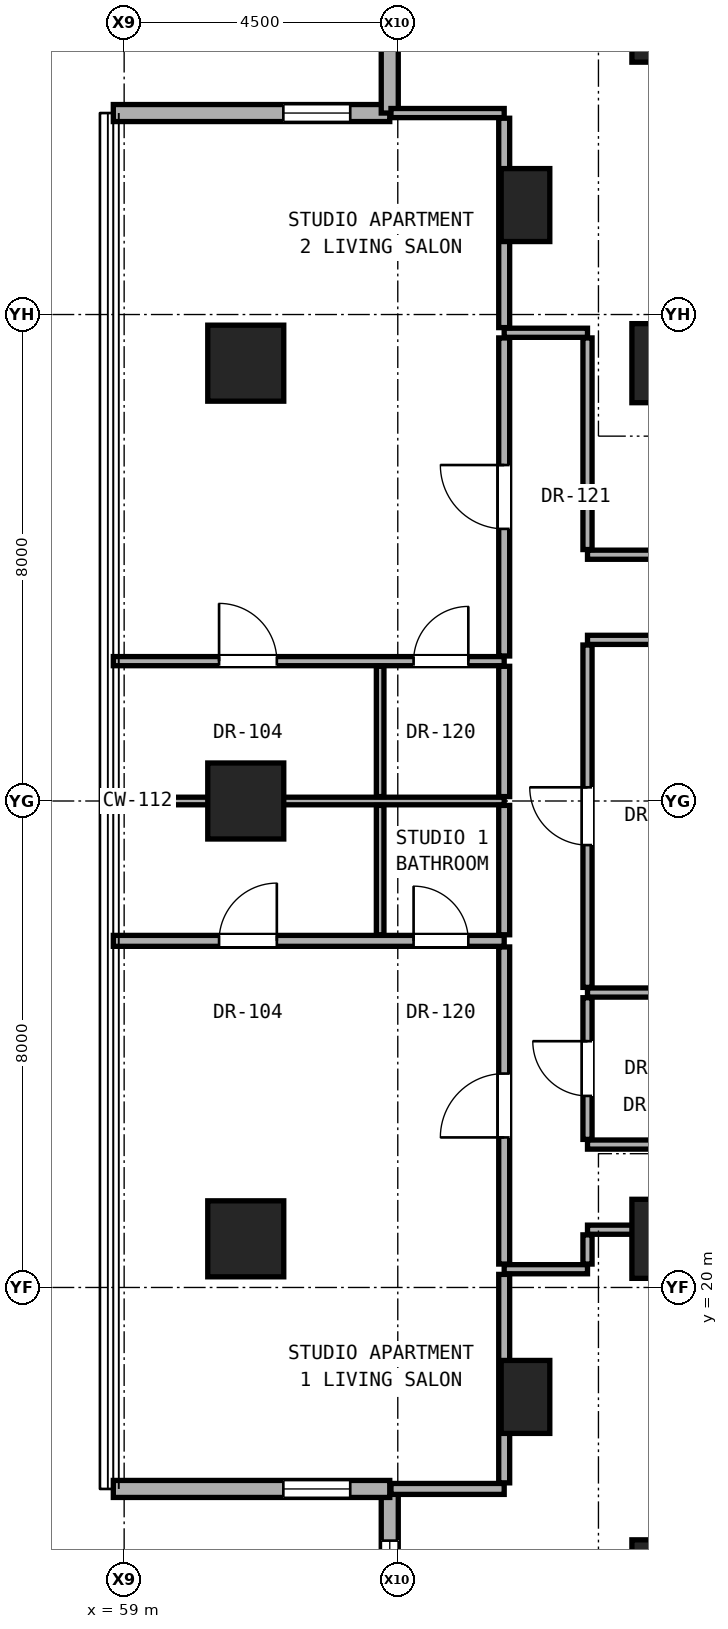
"""IFC4 building model, lengths in metres.
Left out: names, types, materials, properties, quantities, classifications, styles, units other than length and angle.
Written with IfcOpenShell. Run it as: python <this file> out.ifc"""

import sys

from ifc_helpers import new_model, si_unit, direction, frame, frame_2d, origin, origin_2d, place, context, subcontext, project, spatial, rectangle, hollow_rectangle, extrude, element, fill, save


model = new_model("IFC4")
c1 = context("Model", 3, precision=1e-05, world=origin(), true_north=direction((0.0, 1.0)))
c2 = subcontext(c1, "Body", "Model", "MODEL_VIEW")
j1 = project(units=[si_unit("LENGTHUNIT", "METRE"), si_unit("PLANEANGLEUNIT", "RADIAN")], contexts=[c1])
p1 = place(None, origin())
s1 = spatial("IfcSite", under=j1, at=p1, CompositionType="ELEMENT")
p2 = place(p1, origin())
s2 = spatial("IfcBuilding", under=s1, at=p2, CompositionType="ELEMENT")
p3 = place(p2, frame((0.0, 0.0, 55.4)))
s3 = spatial("IfcBuildingStorey", under=s2, at=p3, CompositionType="ELEMENT", Elevation=55.4)
for number, where, z_axis, x_axis in (
    (1, (68.0, 15.2, 0.0), (0.0, 0.0, 1.0), (1.0, 0.0, 0.0)),
    (2, (68.0, 20.8, 0.0), (0.0, 0.0, 1.0), (1.0, 0.0, 0.0)),
    (3, (68.0, 35.2, 0.0), (0.0, 0.0, 1.0), (1.0, 0.0, 0.0)),
    (4, (68.0, 40.8, 0.0), (0.0, 0.0, 1.0), (1.0, 0.0, 0.0)),
):
    element("IfcColumn", number, at=place(p3, frame(where, z_axis=z_axis, x_axis=x_axis)), inside=s3, PredefinedType="COLUMN", context=c2, shape_type="SweptSolid", body=[
        extrude(rectangle(XDim=1.3, YDim=1.3, at=origin_2d()), origin(), (0.0, 0.0, 1.0), 3.3),
    ])
for number, where, z_axis, x_axis in (
    (5, (61.0, 20.8, 0.0), (0.0, 0.0, 1.0), (1.0, 0.0, 0.0)),
    (6, (61.0, 28.0, 0.0), (0.0, 0.0, 1.0), (1.0, 0.0, 0.0)),
    (7, (61.0, 35.2, 0.0), (0.0, 0.0, 1.0), (1.0, 0.0, 0.0)),
):
    element("IfcColumn", number, at=place(p3, frame(where, z_axis=z_axis, x_axis=x_axis)), inside=s3, PredefinedType="COLUMN", context=c2, shape_type="SweptSolid", body=[
        extrude(hollow_rectangle(XDim=1.25, YDim=1.25, WallThickness=0.07, at=origin_2d()), origin(), (0.0, 0.0, 1.0), 3.3),
    ])
for number, where, z_axis, x_axis in (
    (8, (65.6, 18.2, 0.0), (0.0, 0.0, 1.0), (1.0, 0.0, 0.0)),
    (9, (65.6, 37.8, 0.0), (0.0, 0.0, 1.0), (1.0, 0.0, 0.0)),
):
    element("IfcColumn", number, at=place(p3, frame(where, z_axis=z_axis, x_axis=x_axis)), inside=s3, PredefinedType="PILASTER", context=c2, shape_type="SweptSolid", body=[
        extrude(rectangle(XDim=0.8, YDim=1.2, at=origin_2d()), origin(), (0.0, 0.0, 1.0), 3.3),
    ])
p4 = place(p3, frame((63.368, 16.687, 0.0), z_axis=(0.0, 0.0, 1.0), x_axis=(0.0, -1.0, 0.0)))
e10 = element("IfcWall", 10, at=p4, inside=s3, PredefinedType="SOLIDWALL", context=c2, shape_type="SweptSolid", body=[
    extrude(rectangle(XDim=4.546, YDim=0.28, at=frame_2d((2.273, 0.0))), origin(), (0.0, 0.0, 1.0), 3.04),
])
p5 = place(p4, frame((0.85, 0.0, 0.79)))
e11 = element("IfcOpeningElement", 11, at=p5, cuts=e10, PredefinedType="OPENING", context=c2, shape_type="SweptSolid", body=[
    extrude(rectangle(XDim=1.8, YDim=2.1, at=frame_2d((0.9, 1.05))), frame((0.0, 0.15, 0.0), z_axis=(0.0, -1.0, 0.0), x_axis=(1.0, 0.0, 0.0)), (0.0, 0.0, 1.0), 0.3),
])
p6 = place(p3, frame((58.822, 16.687, 0.0), z_axis=(0.0, 0.0, 1.0), x_axis=(1.0, 0.0, 0.0)))
e12 = element("IfcWall", 12, at=p6, inside=s3, PredefinedType="SOLIDWALL", context=c2, shape_type="SweptSolid", body=[
    extrude(rectangle(XDim=4.546, YDim=0.28, at=frame_2d((2.273, 0.0))), origin(), (0.0, 0.0, 1.0), 3.04),
])
p7 = place(p6, frame((2.796, 0.0, 0.85)))
e13 = element("IfcOpeningElement", 13, at=p7, cuts=e12, PredefinedType="OPENING", context=c2, shape_type="SweptSolid", body=[
    extrude(rectangle(XDim=1.1, YDim=2.0, at=frame_2d((0.55, 1.0))), frame((0.0, 0.15, 0.0), z_axis=(0.0, -1.0, 0.0), x_axis=(1.0, 0.0, 0.0)), (0.0, 0.0, 1.0), 0.3),
])
p8 = place(p3, frame((63.368, 39.313, 0.0), z_axis=(0.0, 0.0, 1.0), x_axis=(-1.0, 0.0, 0.0)))
e14 = element("IfcWall", 14, at=p8, inside=s3, PredefinedType="SOLIDWALL", context=c2, shape_type="SweptSolid", body=[
    extrude(rectangle(XDim=4.546, YDim=0.28, at=frame_2d((2.273, 0.0))), origin(), (0.0, 0.0, 1.0), 3.04),
])
p9 = place(p8, frame((0.65, 0.0, 0.85)))
e15 = element("IfcOpeningElement", 15, at=p9, cuts=e14, PredefinedType="OPENING", context=c2, shape_type="SweptSolid", body=[
    extrude(rectangle(XDim=1.1, YDim=2.0, at=frame_2d((0.55, 1.0))), frame((0.0, 0.15, 0.0), z_axis=(0.0, -1.0, 0.0), x_axis=(1.0, 0.0, 0.0)), (0.0, 0.0, 1.0), 0.3),
])
p10 = place(p3, frame((63.368, 43.859, 0.0), z_axis=(0.0, 0.0, 1.0), x_axis=(0.0, -1.0, 0.0)))
e16 = element("IfcWall", 16, at=p10, inside=s3, PredefinedType="SOLIDWALL", context=c2, shape_type="SweptSolid", body=[
    extrude(rectangle(XDim=4.546, YDim=0.28, at=frame_2d((2.273, 0.0))), origin(), (0.0, 0.0, 1.0), 3.04),
])
p11 = place(p3, frame((63.388, 16.687, 0.0), z_axis=(0.0, 0.0, 1.0), x_axis=(1.0, 0.0, 0.0)))
e17 = element("IfcWall", 17, at=p11, inside=s3, PredefinedType="PARTITIONING", context=c2, shape_type="SweptSolid", body=[
    extrude(rectangle(XDim=1.862, YDim=0.18, at=frame_2d((0.931, 0.0))), origin(), (0.0, 0.0, 1.0), 3.06),
])
p12 = place(p3, frame((65.25, 20.3, 0.0), z_axis=(0.0, 0.0, 1.0), x_axis=(1.0, 0.0, 0.0)))
e18 = element("IfcWall", 18, at=p12, inside=s3, PredefinedType="PARTITIONING", context=c2, shape_type="SweptSolid", body=[
    extrude(rectangle(XDim=1.37, YDim=0.15, at=frame_2d((0.685, 0.0))), origin(), (0.0, 0.0, 1.0), 3.06),
])
p13 = place(p3, frame((66.62, 20.95, 0.0), z_axis=(0.0, 0.0, 1.0), x_axis=(1.0, 0.0, 0.0)))
e19 = element("IfcWall", 19, at=p13, inside=s3, PredefinedType="PARTITIONING", context=c2, shape_type="SweptSolid", body=[
    extrude(rectangle(XDim=1.06, YDim=0.15, at=frame_2d((0.53, 0.0))), origin(), (0.0, 0.0, 1.0), 2.452),
])
p14 = place(p3, frame((66.62, 22.35, 0.0), z_axis=(0.0, 0.0, 1.0), x_axis=(1.0, 0.0, 0.0)))
e20 = element("IfcWall", 20, at=p14, inside=s3, PredefinedType="PARTITIONING", context=c2, shape_type="SweptSolid", body=[
    extrude(rectangle(XDim=19.63, YDim=0.15, at=frame_2d((9.815, 0.0))), origin(), (0.0, 0.0, 1.0), 2.125),
])
p15 = place(p14, frame((8.129, 0.0, 0.0)))
e21 = element("IfcOpeningElement", 21, at=p15, cuts=e20, PredefinedType="OPENING", context=c2, shape_type="SweptSolid", body=[
    extrude(rectangle(XDim=0.85, YDim=2.01, at=frame_2d((0.425, 1.005))), frame((0.0, 0.085, 0.0), z_axis=(0.0, -1.0, 0.0), x_axis=(1.0, 0.0, 0.0)), (0.0, 0.0, 1.0), 0.17),
])
p16 = place(p3, frame((66.62, 24.85, 0.0), z_axis=(0.0, 0.0, 1.0), x_axis=(1.0, 0.0, 0.0)))
e22 = element("IfcWall", 22, at=p16, inside=s3, PredefinedType="PARTITIONING", context=c2, shape_type="SweptSolid", body=[
    extrude(rectangle(XDim=3.13, YDim=0.15, at=frame_2d((1.565, 0.0))), origin(), (0.0, 0.0, 1.0), 2.125),
])
p17 = place(p3, frame((58.822, 25.7, 0.0), z_axis=(0.0, 0.0, 1.0), x_axis=(1.0, 0.0, 0.0)))
e23 = element("IfcWall", 23, at=p17, inside=s3, PredefinedType="PARTITIONING", context=c2, shape_type="SweptSolid", body=[
    extrude(rectangle(XDim=6.428, YDim=0.18, at=frame_2d((3.214, 0.0))), origin(), (0.0, 0.0, 1.0), 2.196),
])
p18 = place(p17, frame((1.739, 0.0, 0.0)))
e24 = element("IfcOpeningElement", 24, at=p18, cuts=e23, PredefinedType="OPENING", context=c2, shape_type="SweptSolid", body=[
    extrude(rectangle(XDim=0.95, YDim=2.15, at=frame_2d((0.475, 1.075))), frame((0.0, 0.1, 0.0), z_axis=(0.0, -1.0, 0.0), x_axis=(1.0, 0.0, 0.0)), (0.0, 0.0, 1.0), 0.2),
])
p19 = place(p17, frame((4.938, 0.0, 0.0)))
e25 = element("IfcOpeningElement", 25, at=p19, cuts=e23, PredefinedType="OPENING", context=c2, shape_type="SweptSolid", body=[
    extrude(rectangle(XDim=0.9, YDim=2.1, at=frame_2d((0.45, 1.05))), frame((0.0, 0.1, 0.0), z_axis=(0.0, -1.0, 0.0), x_axis=(1.0, 0.0, 0.0)), (0.0, 0.0, 1.0), 0.2),
])
p20 = place(p3, frame((58.822, 28.0, 0.0), z_axis=(0.0, 0.0, 1.0), x_axis=(1.0, 0.0, 0.0)))
e26 = element("IfcWall", 26, at=p20, inside=s3, PredefinedType="PARTITIONING", context=c2, shape_type="SweptSolid", body=[
    extrude(rectangle(XDim=6.428, YDim=0.125, at=frame_2d((3.214, 0.0))), origin(), (0.0, 0.0, 1.0), 2.196),
])
p21 = place(p3, frame((58.822, 30.3, 0.0), z_axis=(0.0, 0.0, 1.0), x_axis=(1.0, 0.0, 0.0)))
e27 = element("IfcWall", 27, at=p21, inside=s3, PredefinedType="PARTITIONING", context=c2, shape_type="SweptSolid", body=[
    extrude(rectangle(XDim=6.428, YDim=0.15, at=frame_2d((3.214, 0.0))), origin(), (0.0, 0.0, 1.0), 2.196),
])
p22 = place(p21, frame((1.739, 0.0, 0.0)))
e28 = element("IfcOpeningElement", 28, at=p22, cuts=e27, PredefinedType="OPENING", context=c2, shape_type="SweptSolid", body=[
    extrude(rectangle(XDim=0.95, YDim=2.15, at=frame_2d((0.475, 1.075))), frame((0.0, 0.085, 0.0), z_axis=(0.0, -1.0, 0.0), x_axis=(1.0, 0.0, 0.0)), (0.0, 0.0, 1.0), 0.17),
])
p23 = place(p21, frame((4.938, 0.0, 0.0)))
e29 = element("IfcOpeningElement", 29, at=p23, cuts=e27, PredefinedType="OPENING", context=c2, shape_type="SweptSolid", body=[
    extrude(rectangle(XDim=0.9, YDim=2.1, at=frame_2d((0.45, 1.05))), frame((0.0, 0.085, 0.0), z_axis=(0.0, -1.0, 0.0), x_axis=(1.0, 0.0, 0.0)), (0.0, 0.0, 1.0), 0.17),
])
p24 = place(p3, frame((66.62, 30.65, 0.0), z_axis=(0.0, 0.0, 1.0), x_axis=(1.0, 0.0, 0.0)))
e30 = element("IfcWall", 30, at=p24, inside=s3, PredefinedType="PARTITIONING", context=c2, shape_type="SweptSolid", body=[
    extrude(rectangle(XDim=19.63, YDim=0.15, at=frame_2d((9.815, 0.0))), origin(), (0.0, 0.0, 1.0), 2.125),
])
p25 = place(p24, frame((3.855, 0.0, 0.0)))
e31 = element("IfcOpeningElement", 31, at=p25, cuts=e30, PredefinedType="OPENING", context=c2, shape_type="SweptSolid", body=[
    extrude(rectangle(XDim=0.85, YDim=2.01, at=frame_2d((0.425, 1.005))), frame((0.0, 0.085, 0.0), z_axis=(0.0, -1.0, 0.0), x_axis=(1.0, 0.0, 0.0)), (0.0, 0.0, 1.0), 0.17),
])
p26 = place(p24, frame((15.209, 0.0, 0.0)))
e32 = element("IfcOpeningElement", 32, at=p26, cuts=e30, PredefinedType="OPENING", context=c2, shape_type="SweptSolid", body=[
    extrude(rectangle(XDim=0.85, YDim=2.01, at=frame_2d((0.425, 1.005))), frame((0.0, 0.085, 0.0), z_axis=(0.0, -1.0, 0.0), x_axis=(1.0, 0.0, 0.0)), (0.0, 0.0, 1.0), 0.17),
])
p27 = place(p3, frame((66.62, 32.05, 0.0), z_axis=(0.0, 0.0, 1.0), x_axis=(1.0, 0.0, 0.0)))
e33 = element("IfcWall", 33, at=p27, inside=s3, PredefinedType="PARTITIONING", context=c2, shape_type="SweptSolid", body=[
    extrude(rectangle(XDim=2.18, YDim=0.15, at=frame_2d((1.09, 0.0))), origin(), (0.0, 0.0, 1.0), 2.125),
])
p28 = place(p3, frame((65.25, 35.7, 0.0), z_axis=(0.0, 0.0, 1.0), x_axis=(1.0, 0.0, 0.0)))
e34 = element("IfcWall", 34, at=p28, inside=s3, PredefinedType="PARTITIONING", context=c2, shape_type="SweptSolid", body=[
    extrude(rectangle(XDim=1.37, YDim=0.15, at=frame_2d((0.685, 0.0))), origin(), (0.0, 0.0, 1.0), 3.06),
])
p29 = place(p3, frame((63.388, 39.313, 0.0), z_axis=(0.0, 0.0, 1.0), x_axis=(1.0, 0.0, 0.0)))
e35 = element("IfcWall", 35, at=p29, inside=s3, PredefinedType="PARTITIONING", context=c2, shape_type="SweptSolid", body=[
    extrude(rectangle(XDim=1.862, YDim=0.15, at=frame_2d((0.931, 0.0))), origin(), (0.0, 0.0, 1.0), 3.06),
])
p30 = place(p3, frame((63.21, 25.8, 0.0), z_axis=(0.0, 0.0, 1.0), x_axis=(0.0, 1.0, 0.0)))
e36 = element("IfcWall", 36, at=p30, inside=s3, PredefinedType="PARTITIONING", context=c2, shape_type="SweptSolid", body=[
    extrude(rectangle(XDim=2.127, YDim=0.125, at=frame_2d((1.064, 0.0))), origin(), (0.0, 0.0, 1.0), 2.279),
])
p31 = place(p3, frame((63.21, 28.073, 0.0), z_axis=(0.0, 0.0, 1.0), x_axis=(0.0, 1.0, 0.0)))
e37 = element("IfcWall", 37, at=p31, inside=s3, PredefinedType="PARTITIONING", context=c2, shape_type="SweptSolid", body=[
    extrude(rectangle(XDim=2.143, YDim=0.125, at=frame_2d((1.071, 0.0))), origin(), (0.0, 0.0, 1.0), 2.279),
])
p32 = place(p3, frame((65.25, 16.787, 0.0), z_axis=(0.0, 0.0, 1.0), x_axis=(0.0, 1.0, 0.0)))
e38 = element("IfcWall", 38, at=p32, inside=s3, PredefinedType="PARTITIONING", context=c2, shape_type="SweptSolid", body=[
    extrude(rectangle(XDim=3.428, YDim=0.18, at=frame_2d((1.714, 0.0))), origin(), (0.0, 0.0, 1.0), 2.436),
])
p33 = place(p3, frame((65.25, 20.385, 0.0), z_axis=(0.0, 0.0, 1.0), x_axis=(0.0, 1.0, 0.0)))
e39 = element("IfcWall", 39, at=p33, inside=s3, PredefinedType="PARTITIONING", context=c2, shape_type="SweptSolid", body=[
    extrude(rectangle(XDim=5.215, YDim=0.18, at=frame_2d((2.607, 0.0))), origin(), (0.0, 0.0, 1.0), 2.452),
])
p34 = place(p33, frame((2.083, 0.0, 0.0)))
e40 = element("IfcOpeningElement", 40, at=p34, cuts=e39, PredefinedType="OPENING", context=c2, shape_type="SweptSolid", body=[
    extrude(rectangle(XDim=1.05, YDim=2.2, at=frame_2d((0.525, 1.1))), frame((0.0, 0.1, 0.0), z_axis=(0.0, -1.0, 0.0), x_axis=(1.0, 0.0, 0.0)), (0.0, 0.0, 1.0), 0.2),
])
p35 = place(p3, frame((65.25, 25.8, 0.0), z_axis=(0.0, 0.0, 1.0), x_axis=(0.0, 1.0, 0.0)))
e41 = element("IfcWall", 41, at=p35, inside=s3, PredefinedType="PARTITIONING", context=c2, shape_type="SweptSolid", body=[
    extrude(rectangle(XDim=2.127, YDim=0.18, at=frame_2d((1.064, 0.0))), origin(), (0.0, 0.0, 1.0), 2.279),
])
p36 = place(p3, frame((65.25, 28.073, 0.0), z_axis=(0.0, 0.0, 1.0), x_axis=(0.0, 1.0, 0.0)))
e42 = element("IfcWall", 42, at=p36, inside=s3, PredefinedType="PARTITIONING", context=c2, shape_type="SweptSolid", body=[
    extrude(rectangle(XDim=2.143, YDim=0.18, at=frame_2d((1.071, 0.0))), origin(), (0.0, 0.0, 1.0), 2.279),
])
p37 = place(p3, frame((65.25, 30.385, 0.0), z_axis=(0.0, 0.0, 1.0), x_axis=(0.0, 1.0, 0.0)))
e43 = element("IfcWall", 43, at=p37, inside=s3, PredefinedType="PARTITIONING", context=c2, shape_type="SweptSolid", body=[
    extrude(rectangle(XDim=5.23, YDim=0.18, at=frame_2d((2.615, 0.0))), origin(), (0.0, 0.0, 1.0), 2.452),
])
p38 = place(p37, frame((2.09, 0.0, 0.0)))
e44 = element("IfcOpeningElement", 44, at=p38, cuts=e43, PredefinedType="OPENING", context=c2, shape_type="SweptSolid", body=[
    extrude(rectangle(XDim=1.05, YDim=2.2, at=frame_2d((0.525, 1.1))), frame((0.0, 0.1, 0.0), z_axis=(0.0, -1.0, 0.0), x_axis=(1.0, 0.0, 0.0)), (0.0, 0.0, 1.0), 0.2),
])
p39 = place(p3, frame((65.25, 35.785, 0.0), z_axis=(0.0, 0.0, 1.0), x_axis=(0.0, 1.0, 0.0)))
e45 = element("IfcWall", 45, at=p39, inside=s3, PredefinedType="PARTITIONING", context=c2, shape_type="SweptSolid", body=[
    extrude(rectangle(XDim=3.443, YDim=0.18, at=frame_2d((1.722, 0.0))), origin(), (0.0, 0.0, 1.0), 2.436),
])
p40 = place(p3, frame((66.62, 20.385, 0.0), z_axis=(0.0, 0.0, 1.0), x_axis=(0.0, 1.0, 0.0)))
e46 = element("IfcWall", 46, at=p40, inside=s3, PredefinedType="PARTITIONING", context=c2, shape_type="SweptSolid", body=[
    extrude(rectangle(XDim=0.48, YDim=0.15, at=frame_2d((0.24, 0.0))), origin(), (0.0, 0.0, 1.0), 2.452),
])
p41 = place(p3, frame((66.62, 22.435, 0.0), z_axis=(0.0, 0.0, 1.0), x_axis=(0.0, 1.0, 0.0)))
e47 = element("IfcWall", 47, at=p41, inside=s3, PredefinedType="PARTITIONING", context=c2, shape_type="SweptSolid", body=[
    extrude(rectangle(XDim=2.33, YDim=0.15, at=frame_2d((1.165, 0.0))), origin(), (0.0, 0.0, 1.0), 3.06),
])
p42 = place(p41, frame((0.715, 0.0, 0.0)))
e48 = element("IfcOpeningElement", 48, at=p42, cuts=e47, PredefinedType="OPENING", context=c2, shape_type="SweptSolid", body=[
    extrude(rectangle(XDim=0.9, YDim=2.1, at=frame_2d((0.45, 1.05))), frame((0.0, 0.085, 0.0), z_axis=(0.0, -1.0, 0.0), x_axis=(1.0, 0.0, 0.0)), (0.0, 0.0, 1.0), 0.17),
])
p43 = place(p3, frame((66.62, 24.935, 0.0), z_axis=(0.0, 0.0, 1.0), x_axis=(0.0, 1.0, 0.0)))
e49 = element("IfcWall", 49, at=p43, inside=s3, PredefinedType="PARTITIONING", context=c2, shape_type="SweptSolid", body=[
    extrude(rectangle(XDim=5.63, YDim=0.15, at=frame_2d((2.815, 0.0))), origin(), (0.0, 0.0, 1.0), 2.279),
])
p44 = place(p43, frame((2.34, 0.0, 0.0)))
e50 = element("IfcOpeningElement", 50, at=p44, cuts=e49, PredefinedType="OPENING", context=c2, shape_type="SweptSolid", body=[
    extrude(rectangle(XDim=0.95, YDim=2.15, at=frame_2d((0.475, 1.075))), frame((0.0, 0.085, 0.0), z_axis=(0.0, -1.0, 0.0), x_axis=(1.0, 0.0, 0.0)), (0.0, 0.0, 1.0), 0.17),
])
p45 = place(p3, frame((66.62, 32.135, 0.0), z_axis=(0.0, 0.0, 1.0), x_axis=(0.0, 1.0, 0.0)))
e51 = element("IfcWall", 51, at=p45, inside=s3, PredefinedType="PARTITIONING", context=c2, shape_type="SweptSolid", body=[
    extrude(rectangle(XDim=3.48, YDim=0.15, at=frame_2d((1.74, 0.0))), origin(), (0.0, 0.0, 1.0), 2.452),
])
p46 = place(p5, origin())
e52 = element("IfcWindow", 52, at=p46, inside=s3, PartitioningType="SINGLE_PANEL", PredefinedType="WINDOW", context=c2, shape_type="SweptSolid", body=[
    extrude(rectangle(XDim=1.8, YDim=2.1, at=frame_2d((0.9, 1.05))), frame((0.0, 0.03, 0.0), z_axis=(0.0, -1.0, 0.0), x_axis=(1.0, 0.0, 0.0)), (0.0, 0.0, 1.0), 0.06),
])
fill(e11, e52)
p47 = place(p7, origin())
e53 = element("IfcWindow", 53, at=p47, inside=s3, PartitioningType="SINGLE_PANEL", PredefinedType="WINDOW", context=c2, shape_type="SweptSolid", body=[
    extrude(rectangle(XDim=1.1, YDim=2.0, at=frame_2d((0.55, 1.0))), frame((0.0, 0.03, 0.0), z_axis=(0.0, -1.0, 0.0), x_axis=(1.0, 0.0, 0.0)), (0.0, 0.0, 1.0), 0.06),
])
fill(e13, e53)
p48 = place(p9, origin())
e54 = element("IfcWindow", 54, at=p48, inside=s3, PartitioningType="SINGLE_PANEL", PredefinedType="WINDOW", context=c2, shape_type="SweptSolid", body=[
    extrude(rectangle(XDim=1.1, YDim=2.0, at=frame_2d((0.55, 1.0))), frame((0.0, 0.03, 0.0), z_axis=(0.0, -1.0, 0.0), x_axis=(1.0, 0.0, 0.0)), (0.0, 0.0, 1.0), 0.06),
])
fill(e15, e54)
p49 = place(p42, origin())
e55 = element("IfcDoor", 55, at=p49, inside=s3, OperationType="SINGLE_SWING_RIGHT", PredefinedType="DOOR", context=c2, shape_type="SweptSolid", body=[
    extrude(rectangle(XDim=0.9, YDim=2.1, at=frame_2d((0.45, 1.05))), frame((0.0, 0.025, 0.0), z_axis=(0.0, -1.0, 0.0), x_axis=(1.0, 0.0, 0.0)), (0.0, 0.0, 1.0), 0.05),
])
fill(e48, e55)
p50 = place(p34, origin())
e56 = element("IfcDoor", 56, at=p50, inside=s3, OperationType="SINGLE_SWING_LEFT", PredefinedType="DOOR", context=c2, shape_type="SweptSolid", body=[
    extrude(rectangle(XDim=1.05, YDim=2.2, at=frame_2d((0.525, 1.1))), frame((0.0, 0.025, 0.0), z_axis=(0.0, -1.0, 0.0), x_axis=(1.0, 0.0, 0.0)), (0.0, 0.0, 1.0), 0.05),
])
fill(e40, e56)
p51 = place(p18, origin())
e57 = element("IfcDoor", 57, at=p51, inside=s3, OperationType="SINGLE_SWING_RIGHT", PredefinedType="DOOR", context=c2, shape_type="SweptSolid", body=[
    extrude(rectangle(XDim=0.95, YDim=2.15, at=frame_2d((0.475, 1.075))), frame((0.0, 0.025, 0.0), z_axis=(0.0, -1.0, 0.0), x_axis=(1.0, 0.0, 0.0)), (0.0, 0.0, 1.0), 0.05),
])
fill(e24, e57)
p52 = place(p19, origin())
e58 = element("IfcDoor", 58, at=p52, inside=s3, OperationType="SINGLE_SWING_LEFT", PredefinedType="DOOR", context=c2, shape_type="SweptSolid", body=[
    extrude(rectangle(XDim=0.9, YDim=2.1, at=frame_2d((0.45, 1.05))), frame((0.0, 0.025, 0.0), z_axis=(0.0, -1.0, 0.0), x_axis=(1.0, 0.0, 0.0)), (0.0, 0.0, 1.0), 0.05),
])
fill(e25, e58)
p53 = place(p38, origin())
e59 = element("IfcDoor", 59, at=p53, inside=s3, OperationType="SINGLE_SWING_RIGHT", PredefinedType="DOOR", context=c2, shape_type="SweptSolid", body=[
    extrude(rectangle(XDim=1.05, YDim=2.2, at=frame_2d((0.525, 1.1))), frame((0.0, 0.025, 0.0), z_axis=(0.0, -1.0, 0.0), x_axis=(1.0, 0.0, 0.0)), (0.0, 0.0, 1.0), 0.05),
])
fill(e44, e59)
p54 = place(p22, origin())
e60 = element("IfcDoor", 60, at=p54, inside=s3, OperationType="SINGLE_SWING_LEFT", PredefinedType="DOOR", context=c2, shape_type="SweptSolid", body=[
    extrude(rectangle(XDim=0.95, YDim=2.15, at=frame_2d((0.475, 1.075))), frame((0.0, 0.025, 0.0), z_axis=(0.0, -1.0, 0.0), x_axis=(1.0, 0.0, 0.0)), (0.0, 0.0, 1.0), 0.05),
])
fill(e28, e60)
p55 = place(p23, origin())
e61 = element("IfcDoor", 61, at=p55, inside=s3, OperationType="SINGLE_SWING_RIGHT", PredefinedType="DOOR", context=c2, shape_type="SweptSolid", body=[
    extrude(rectangle(XDim=0.9, YDim=2.1, at=frame_2d((0.45, 1.05))), frame((0.0, 0.025, 0.0), z_axis=(0.0, -1.0, 0.0), x_axis=(1.0, 0.0, 0.0)), (0.0, 0.0, 1.0), 0.05),
])
fill(e29, e61)
p56 = place(p44, origin())
e62 = element("IfcDoor", 62, at=p56, inside=s3, OperationType="SINGLE_SWING_RIGHT", PredefinedType="DOOR", context=c2, shape_type="SweptSolid", body=[
    extrude(rectangle(XDim=0.95, YDim=2.15, at=frame_2d((0.475, 1.075))), frame((0.0, 0.025, 0.0), z_axis=(0.0, -1.0, 0.0), x_axis=(1.0, 0.0, 0.0)), (0.0, 0.0, 1.0), 0.05),
])
fill(e50, e62)
save(model, sys.argv[1])
